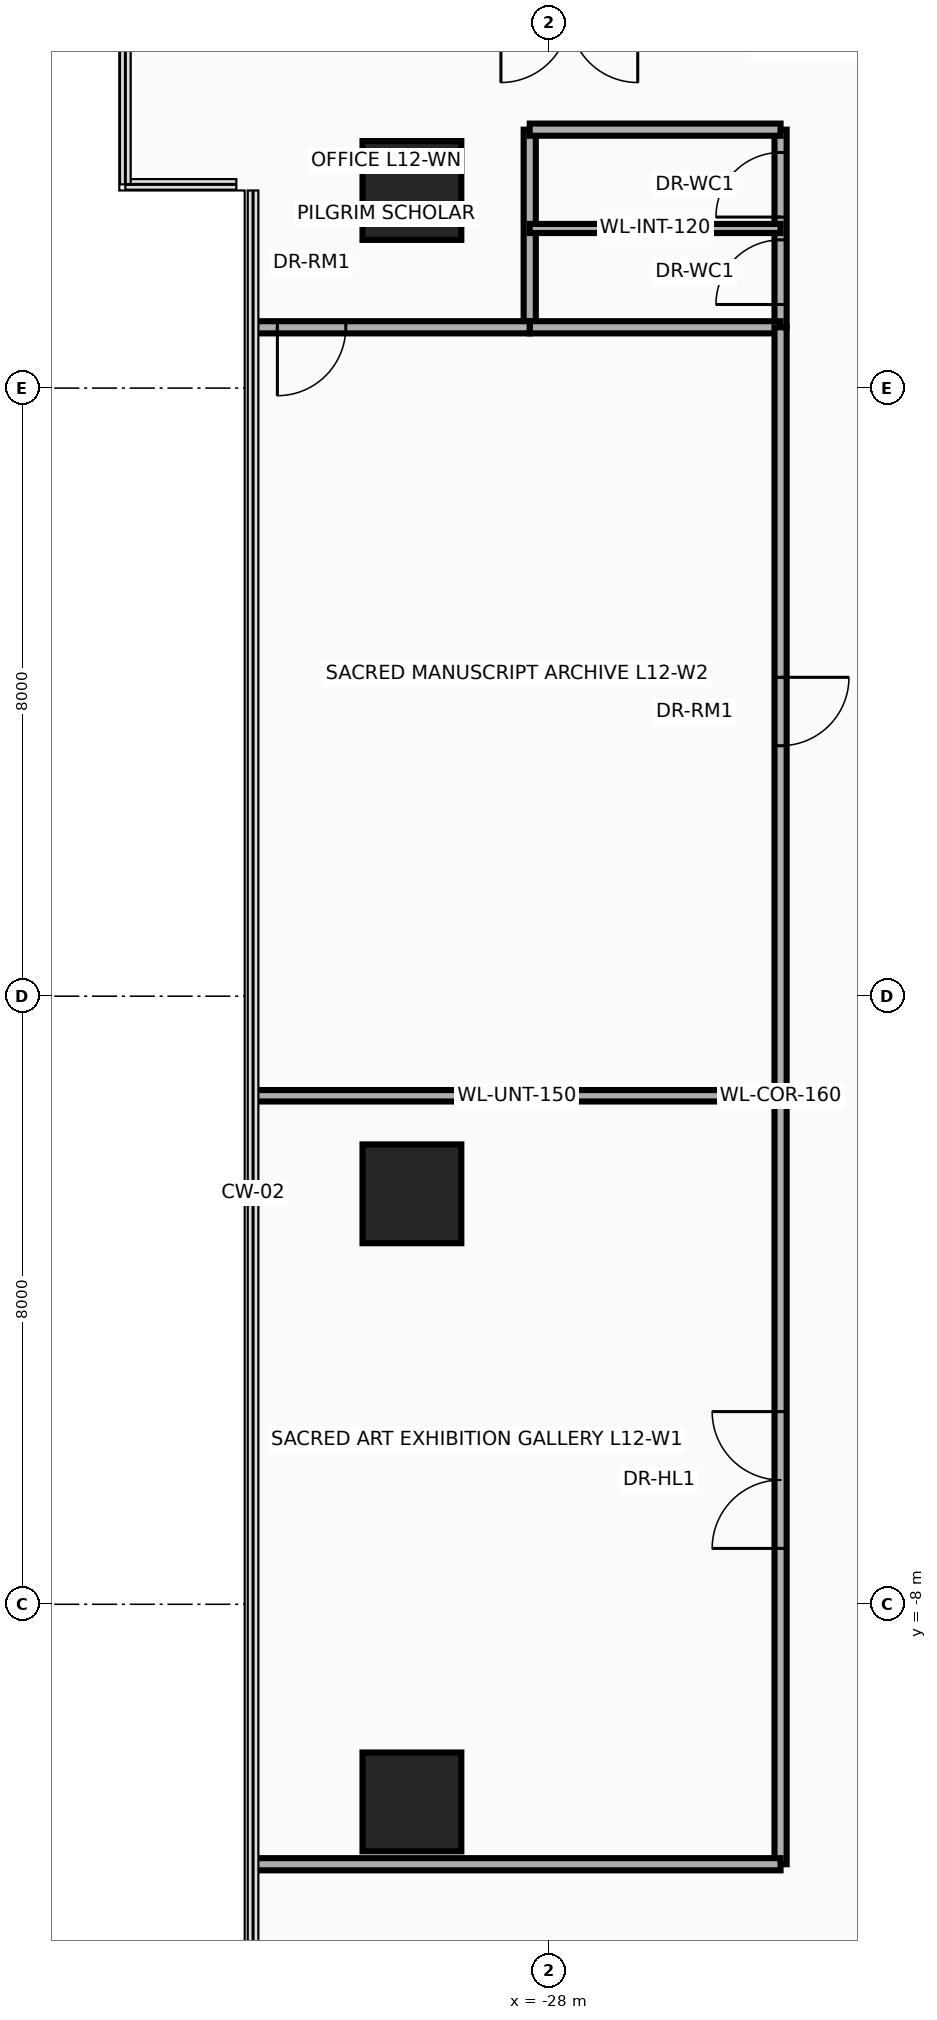
"""IFC4 building model, lengths in metres.
Left out: names, types, materials, properties, quantities, classifications, styles, units other than length and angle.
Written with IfcOpenShell. Run it as: python <this file> out.ifc"""

import sys

from ifc_helpers import new_model, si_unit, direction, frame, frame_2d, origin, origin_2d, place, context, subcontext, project, spatial, rectangle, circle, extrude, source, transform, mapped, element, fill, save


model = new_model("IFC4")
c1 = context("Model", 3, precision=1e-05, world=origin(), true_north=direction((0.0, 1.0)))
c2 = subcontext(c1, "Body", "Model", "MODEL_VIEW")
j1 = project(units=[si_unit("LENGTHUNIT", "METRE"), si_unit("PLANEANGLEUNIT", "RADIAN")], contexts=[c1])
p1 = place(None, origin())
s1 = spatial("IfcSite", under=j1, at=p1, CompositionType="ELEMENT")
p2 = place(p1, origin())
s2 = spatial("IfcBuilding", under=s1, at=p2, CompositionType="ELEMENT")
p3 = place(p2, frame((0.0, 0.0, 51.9)))
s3 = spatial("IfcBuildingStorey", under=s2, at=p3, CompositionType="ELEMENT", Elevation=51.9)
m1 = source(origin(), c2, "Body", "SweptSolid", [
    extrude(circle(Radius=0.65, at=origin_2d()), origin(), (0.0, 0.0, 1.0), 3.7),
])
for number, where, z_axis, x_axis in (
    (1, (-29.8, -10.6, 0.0), (0.0, 0.0, 1.0), (1.0, 0.0, 0.0)),
    (2, (-29.8, -2.6, 0.0), (0.0, 0.0, 1.0), (1.0, 0.0, 0.0)),
    (3, (-29.8, 10.6, 0.0), (0.0, 0.0, 1.0), (1.0, 0.0, 0.0)),
):
    element("IfcColumn", number, at=place(p3, frame(where, z_axis=z_axis, x_axis=x_axis)), inside=s3, PredefinedType="COLUMN", context=c2, shape_type="MappedRepresentation", body=[
        mapped(m1, transform((0.0, 0.0, 0.0), x_axis=(1.0, 0.0, 0.0), y_axis=(0.0, 1.0, 0.0), z_axis=(0.0, 0.0, 1.0), scale=1.0)),
    ])
p4 = place(p3, frame((-28.25, 8.8, 0.0), z_axis=(0.0, 0.0, 1.0), x_axis=(0.0, 1.0, 0.0)))
e4 = element("IfcWall", 4, at=p4, inside=s3, PredefinedType="PARTITIONING", context=c2, shape_type="SweptSolid", body=[
    extrude(rectangle(XDim=2.6, YDim=0.16, at=frame_2d((1.3, 0.0))), origin(), (0.0, 0.0, 1.0), 2.583),
])
p5 = place(p3, frame((-24.95, 8.8, 0.0), z_axis=(0.0, 0.0, 1.0), x_axis=(0.0, 1.0, 0.0)))
e5 = element("IfcWall", 5, at=p5, inside=s3, PredefinedType="PARTITIONING", context=c2, shape_type="SweptSolid", body=[
    extrude(rectangle(XDim=2.6, YDim=0.16, at=frame_2d((1.3, 0.0))), origin(), (0.0, 0.0, 1.0), 2.583),
])
p6 = place(p5, frame((0.3, 0.0, 0.0)))
e6 = element("IfcOpeningElement", 6, at=p6, cuts=e5, PredefinedType="OPENING", context=c2, shape_type="SweptSolid", body=[
    extrude(rectangle(XDim=0.85, YDim=2.1, at=frame_2d((0.425, 1.05))), frame((0.0, 0.095, 0.0), z_axis=(0.0, -1.0, 0.0), x_axis=(1.0, 0.0, 0.0)), (0.0, 0.0, 1.0), 0.19),
])
p7 = place(p5, frame((1.45, 0.0, 0.0)))
e7 = element("IfcOpeningElement", 7, at=p7, cuts=e5, PredefinedType="OPENING", context=c2, shape_type="SweptSolid", body=[
    extrude(rectangle(XDim=0.85, YDim=2.1, at=frame_2d((0.425, 1.05))), frame((0.0, 0.095, 0.0), z_axis=(0.0, -1.0, 0.0), x_axis=(1.0, 0.0, 0.0)), (0.0, 0.0, 1.0), 0.19),
])
for number, where, z_axis, x_axis in (
    (8, (-28.25, 8.8, 0.0), (0.0, 0.0, 1.0), (1.0, 0.0, 0.0)),
    (9, (-28.25, 11.4, 0.0), (0.0, 0.0, 1.0), (1.0, 0.0, 0.0)),
):
    element("IfcWall", number, at=place(p3, frame(where, z_axis=z_axis, x_axis=x_axis)), inside=s3, PredefinedType="PARTITIONING", context=c2, shape_type="SweptSolid", body=[
        extrude(rectangle(XDim=3.3, YDim=0.16, at=frame_2d((1.65, 0.0))), origin(), (0.0, 0.0, 1.0), 3.46),
    ])
p8 = place(p3, frame((-28.25, 10.1, 0.0), z_axis=(0.0, 0.0, 1.0), x_axis=(1.0, 0.0, 0.0)))
e10 = element("IfcWall", 10, at=p8, inside=s3, PredefinedType="PARTITIONING", context=c2, shape_type="SweptSolid", body=[
    extrude(rectangle(XDim=3.3, YDim=0.12, at=frame_2d((1.65, 0.0))), origin(), (0.0, 0.0, 1.0), 3.46),
])
p9 = place(p3, frame((-24.95, -11.42, 0.0), z_axis=(0.0, 0.0, 1.0), x_axis=(0.0, 1.0, 0.0)))
e11 = element("IfcWall", 11, at=p9, inside=s3, PredefinedType="PARTITIONING", context=c2, shape_type="SweptSolid", body=[
    extrude(rectangle(XDim=20.22, YDim=0.16, at=frame_2d((10.11, 0.0))), origin(), (0.0, 0.0, 1.0), 2.583),
])
p10 = place(p9, frame((4.155, 0.0, 0.0)))
e12 = element("IfcOpeningElement", 12, at=p10, cuts=e11, PredefinedType="OPENING", context=c2, shape_type="SweptSolid", body=[
    extrude(rectangle(XDim=1.8, YDim=2.15, at=frame_2d((0.9, 1.075))), frame((0.0, 0.095, 0.0), z_axis=(0.0, -1.0, 0.0), x_axis=(1.0, 0.0, 0.0)), (0.0, 0.0, 1.0), 0.19),
])
p11 = place(p9, frame((14.715, 0.0, 0.0)))
e13 = element("IfcOpeningElement", 13, at=p11, cuts=e11, PredefinedType="OPENING", context=c2, shape_type="SweptSolid", body=[
    extrude(rectangle(XDim=0.9, YDim=2.1, at=frame_2d((0.45, 1.05))), frame((0.0, 0.095, 0.0), z_axis=(0.0, -1.0, 0.0), x_axis=(1.0, 0.0, 0.0)), (0.0, 0.0, 1.0), 0.19),
])
p12 = place(p3, frame((-31.89, 8.8, 0.0), z_axis=(0.0, 0.0, 1.0), x_axis=(1.0, 0.0, 0.0)))
e14 = element("IfcWall", 14, at=p12, inside=s3, PredefinedType="PARTITIONING", context=c2, shape_type="SweptSolid", body=[
    extrude(rectangle(XDim=3.64, YDim=0.16, at=frame_2d((1.82, 0.0))), origin(), (0.0, 0.0, 1.0), 2.896),
])
p13 = place(p12, frame((0.32, 0.0, 0.0)))
e15 = element("IfcOpeningElement", 15, at=p13, cuts=e14, PredefinedType="OPENING", context=c2, shape_type="SweptSolid", body=[
    extrude(rectangle(XDim=0.9, YDim=2.1, at=frame_2d((0.45, 1.05))), frame((0.0, 0.095, 0.0), z_axis=(0.0, -1.0, 0.0), x_axis=(1.0, 0.0, 0.0)), (0.0, 0.0, 1.0), 0.19),
])
p14 = place(p3, frame((-31.89, -1.31, 0.0), z_axis=(0.0, 0.0, 1.0), x_axis=(1.0, 0.0, 0.0)))
e16 = element("IfcWall", 16, at=p14, inside=s3, PredefinedType="PARTITIONING", context=c2, shape_type="SweptSolid", body=[
    extrude(rectangle(XDim=6.94, YDim=0.15, at=frame_2d((3.47, 0.0))), origin(), (0.0, 0.0, 1.0), 2.896),
])
p15 = place(p3, frame((-31.89, -11.42, 0.0), z_axis=(0.0, 0.0, 1.0), x_axis=(1.0, 0.0, 0.0)))
e17 = element("IfcWall", 17, at=p15, inside=s3, PredefinedType="PARTITIONING", context=c2, shape_type="SweptSolid", body=[
    extrude(rectangle(XDim=6.94, YDim=0.16, at=frame_2d((3.47, 0.0))), origin(), (0.0, 0.0, 1.0), 3.46),
])
p16 = place(p6, origin())
e18 = element("IfcDoor", 18, at=p16, inside=s3, OperationType="SINGLE_SWING_LEFT", PredefinedType="DOOR", context=c2, shape_type="SweptSolid", body=[
    extrude(rectangle(XDim=0.85, YDim=2.1, at=frame_2d((0.425, 1.05))), frame((0.0, 0.025, 0.0), z_axis=(0.0, -1.0, 0.0), x_axis=(1.0, 0.0, 0.0)), (0.0, 0.0, 1.0), 0.05),
])
fill(e6, e18)
p17 = place(p7, origin())
e19 = element("IfcDoor", 19, at=p17, inside=s3, OperationType="SINGLE_SWING_RIGHT", PredefinedType="DOOR", context=c2, shape_type="SweptSolid", body=[
    extrude(rectangle(XDim=0.85, YDim=2.1, at=frame_2d((0.425, 1.05))), frame((0.0, 0.025, 0.0), z_axis=(0.0, -1.0, 0.0), x_axis=(1.0, 0.0, 0.0)), (0.0, 0.0, 1.0), 0.05),
])
fill(e7, e19)
p18 = place(p13, frame((0.9, 0.0, 0.0), z_axis=(0.0, 0.0, 1.0), x_axis=(-1.0, 0.0, 0.0)))
e20 = element("IfcDoor", 20, at=p18, inside=s3, OperationType="SINGLE_SWING_LEFT", PredefinedType="DOOR", context=c2, shape_type="SweptSolid", body=[
    extrude(rectangle(XDim=0.9, YDim=2.1, at=frame_2d((0.45, 1.05))), frame((0.0, 0.025, 0.0), z_axis=(0.0, -1.0, 0.0), x_axis=(1.0, 0.0, 0.0)), (0.0, 0.0, 1.0), 0.05),
])
fill(e15, e20)
p19 = place(p10, origin())
e21 = element("IfcDoor", 21, at=p19, inside=s3, OperationType="DOUBLE_DOOR_SINGLE_SWING", PredefinedType="DOOR", context=c2, shape_type="SweptSolid", body=[
    extrude(rectangle(XDim=1.8, YDim=2.15, at=frame_2d((0.9, 1.075))), frame((0.0, 0.025, 0.0), z_axis=(0.0, -1.0, 0.0), x_axis=(1.0, 0.0, 0.0)), (0.0, 0.0, 1.0), 0.05),
])
fill(e12, e21)
p20 = place(p11, frame((0.9, 0.0, 0.0), z_axis=(0.0, 0.0, 1.0), x_axis=(-1.0, 0.0, 0.0)))
e22 = element("IfcDoor", 22, at=p20, inside=s3, OperationType="SINGLE_SWING_LEFT", PredefinedType="DOOR", context=c2, shape_type="SweptSolid", body=[
    extrude(rectangle(XDim=0.9, YDim=2.1, at=frame_2d((0.45, 1.05))), frame((0.0, 0.025, 0.0), z_axis=(0.0, -1.0, 0.0), x_axis=(1.0, 0.0, 0.0)), (0.0, 0.0, 1.0), 0.05),
])
fill(e13, e22)
save(model, sys.argv[1])
